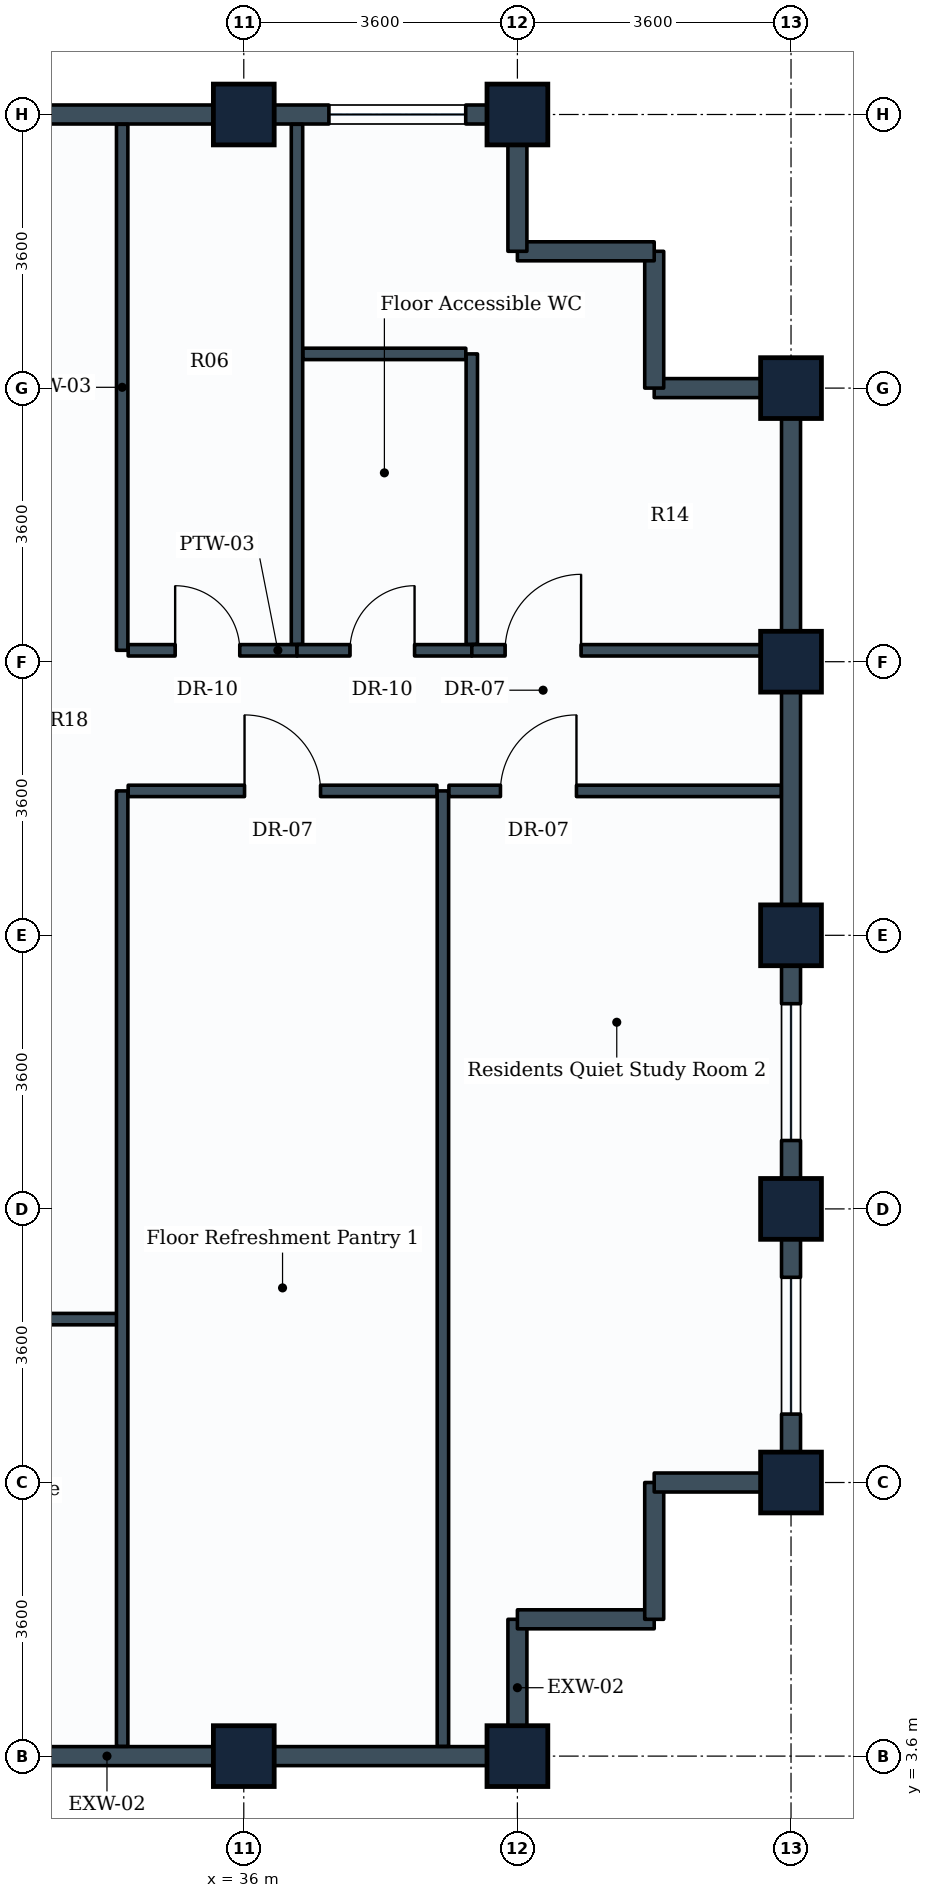
"""IFC4 building model, lengths in metres.
Left out: names, types, materials, properties, quantities, classifications, styles, units other than length and angle.
Written with IfcOpenShell. Run it as: python <this file> out.ifc"""

import sys

from ifc_helpers import new_model, si_unit, direction, frame, frame_2d, origin, origin_2d, place, context, subcontext, project, spatial, rectangle, extrude, element, fill, save


model = new_model("IFC4")
c1 = context("Model", 3, precision=1e-05, world=origin(), true_north=direction((0.0, 1.0)))
c2 = subcontext(c1, "Body", "Model", "MODEL_VIEW")
j1 = project(units=[si_unit("LENGTHUNIT", "METRE"), si_unit("PLANEANGLEUNIT", "RADIAN")], contexts=[c1])
p1 = place(None, origin())
s1 = spatial("IfcSite", under=j1, at=p1, CompositionType="ELEMENT")
p2 = place(p1, origin())
s2 = spatial("IfcBuilding", under=s1, at=p2, CompositionType="ELEMENT")
p3 = place(p2, frame((0.0, 0.0, 266.6)))
s3 = spatial("IfcBuildingStorey", under=s2, at=p3, CompositionType="ELEMENT", Elevation=266.6)
for number, where, z_axis, x_axis in (
    (1, (36.0, 3.6, 0.0), (0.0, 0.0, 1.0), (1.0, 0.0, 0.0)),
    (2, (36.0, 25.2, 0.0), (0.0, 0.0, 1.0), (1.0, 0.0, 0.0)),
    (3, (39.6, 3.6, 0.0), (0.0, 0.0, 1.0), (1.0, 0.0, 0.0)),
    (4, (39.6, 25.2, 0.0), (0.0, 0.0, 1.0), (1.0, 0.0, 0.0)),
    (5, (43.2, 7.2, 0.0), (0.0, 0.0, 1.0), (1.0, 0.0, 0.0)),
    (6, (43.2, 10.8, 0.0), (0.0, 0.0, 1.0), (0.0, 1.0, 0.0)),
    (7, (43.2, 14.4, 0.0), (0.0, 0.0, 1.0), (0.0, 1.0, 0.0)),
    (8, (43.2, 18.0, 0.0), (0.0, 0.0, 1.0), (0.0, 1.0, 0.0)),
    (9, (43.2, 21.6, 0.0), (0.0, 0.0, 1.0), (0.0, 1.0, 0.0)),
):
    element("IfcColumn", number, at=place(p3, frame(where, z_axis=z_axis, x_axis=x_axis)), inside=s3, PredefinedType="COLUMN", context=c2, shape_type="SweptSolid", body=[
        extrude(rectangle(XDim=0.8, YDim=0.8, at=origin_2d()), origin(), (0.0, 0.0, 1.0), 3.6),
    ])
for number, where, z_axis, x_axis in (
    (10, (36.0, 3.6, 0.0), (0.0, 0.0, 1.0), (-1.0, 0.0, 0.0)),
    (11, (39.6, 3.6, 0.0), (0.0, 0.0, 1.0), (-1.0, 0.0, 0.0)),
):
    element("IfcWall", number, at=place(p3, frame(where, z_axis=z_axis, x_axis=x_axis)), inside=s3, PredefinedType="STANDARD", context=c2, shape_type="SweptSolid", body=[
        extrude(rectangle(XDim=3.6, YDim=0.25, at=frame_2d((1.8, 0.0))), origin(), (0.0, 0.0, 1.0), 2.83),
    ])
p4 = place(p3, frame((39.6, 5.4, 0.0), z_axis=(0.0, 0.0, 1.0), x_axis=(0.0, -1.0, 0.0)))
e12 = element("IfcWall", 12, at=p4, inside=s3, PredefinedType="STANDARD", context=c2, shape_type="SweptSolid", body=[
    extrude(rectangle(XDim=1.8, YDim=0.25, at=frame_2d((0.9, 0.0))), origin(), (0.0, 0.0, 1.0), 2.83),
])
p5 = place(p3, frame((41.4, 5.4, 0.0), z_axis=(0.0, 0.0, 1.0), x_axis=(-1.0, 0.0, 0.0)))
e13 = element("IfcWall", 13, at=p5, inside=s3, PredefinedType="STANDARD", context=c2, shape_type="SweptSolid", body=[
    extrude(rectangle(XDim=1.8, YDim=0.25, at=frame_2d((0.9, 0.0))), origin(), (0.0, 0.0, 1.0), 3.335),
])
p6 = place(p3, frame((41.4, 7.2, 0.0), z_axis=(0.0, 0.0, 1.0), x_axis=(0.0, -1.0, 0.0)))
e14 = element("IfcWall", 14, at=p6, inside=s3, PredefinedType="STANDARD", context=c2, shape_type="SweptSolid", body=[
    extrude(rectangle(XDim=1.8, YDim=0.25, at=frame_2d((0.9, 0.0))), origin(), (0.0, 0.0, 1.0), 3.335),
])
p7 = place(p3, frame((43.2, 7.2, 0.0), z_axis=(0.0, 0.0, 1.0), x_axis=(-1.0, 0.0, 0.0)))
e15 = element("IfcWall", 15, at=p7, inside=s3, PredefinedType="STANDARD", context=c2, shape_type="SweptSolid", body=[
    extrude(rectangle(XDim=1.8, YDim=0.25, at=frame_2d((0.9, 0.0))), origin(), (0.0, 0.0, 1.0), 2.83),
])
p8 = place(p3, frame((43.2, 10.8, 0.0), z_axis=(0.0, 0.0, 1.0), x_axis=(0.0, -1.0, 0.0)))
e16 = element("IfcWall", 16, at=p8, inside=s3, PredefinedType="STANDARD", context=c2, shape_type="SweptSolid", body=[
    extrude(rectangle(XDim=3.6, YDim=0.25, at=frame_2d((1.8, 0.0))), origin(), (0.0, 0.0, 1.0), 2.83),
])
p9 = place(p8, frame((0.9, 0.0, 0.85)))
e17 = element("IfcOpeningElement", 17, at=p9, cuts=e16, PredefinedType="OPENING", context=c2, shape_type="SweptSolid", body=[
    extrude(rectangle(XDim=1.8, YDim=1.35, at=frame_2d((0.9, 0.675))), frame((0.0, 0.135, 0.0), z_axis=(0.0, -1.0, 0.0), x_axis=(1.0, 0.0, 0.0)), (0.0, 0.0, 1.0), 0.27),
])
p10 = place(p3, frame((43.2, 14.4, 0.0), z_axis=(0.0, 0.0, 1.0), x_axis=(0.0, -1.0, 0.0)))
e18 = element("IfcWall", 18, at=p10, inside=s3, PredefinedType="STANDARD", context=c2, shape_type="SweptSolid", body=[
    extrude(rectangle(XDim=3.6, YDim=0.25, at=frame_2d((1.8, 0.0))), origin(), (0.0, 0.0, 1.0), 2.83),
])
p11 = place(p10, frame((0.9, 0.0, 0.85)))
e19 = element("IfcOpeningElement", 19, at=p11, cuts=e18, PredefinedType="OPENING", context=c2, shape_type="SweptSolid", body=[
    extrude(rectangle(XDim=1.8, YDim=1.35, at=frame_2d((0.9, 0.675))), frame((0.0, 0.135, 0.0), z_axis=(0.0, -1.0, 0.0), x_axis=(1.0, 0.0, 0.0)), (0.0, 0.0, 1.0), 0.27),
])
for number, where, z_axis, x_axis in (
    (20, (43.2, 18.0, 0.0), (0.0, 0.0, 1.0), (0.0, -1.0, 0.0)),
    (21, (43.2, 21.6, 0.0), (0.0, 0.0, 1.0), (0.0, -1.0, 0.0)),
):
    element("IfcWall", number, at=place(p3, frame(where, z_axis=z_axis, x_axis=x_axis)), inside=s3, PredefinedType="STANDARD", context=c2, shape_type="SweptSolid", body=[
        extrude(rectangle(XDim=3.6, YDim=0.25, at=frame_2d((1.8, 0.0))), origin(), (0.0, 0.0, 1.0), 2.83),
    ])
p12 = place(p3, frame((41.4, 21.6, 0.0), z_axis=(0.0, 0.0, 1.0), x_axis=(1.0, 0.0, 0.0)))
e22 = element("IfcWall", 22, at=p12, inside=s3, PredefinedType="STANDARD", context=c2, shape_type="SweptSolid", body=[
    extrude(rectangle(XDim=1.8, YDim=0.25, at=frame_2d((0.9, 0.0))), origin(), (0.0, 0.0, 1.0), 2.83),
])
for number, where, z_axis, x_axis in (
    (23, (41.4, 23.4, 0.0), (0.0, 0.0, 1.0), (0.0, -1.0, 0.0)),
    (24, (39.6, 23.4, 0.0), (0.0, 0.0, 1.0), (1.0, 0.0, 0.0)),
):
    element("IfcWall", number, at=place(p3, frame(where, z_axis=z_axis, x_axis=x_axis)), inside=s3, PredefinedType="STANDARD", context=c2, shape_type="SweptSolid", body=[
        extrude(rectangle(XDim=1.8, YDim=0.25, at=frame_2d((0.9, 0.0))), origin(), (0.0, 0.0, 1.0), 3.335),
    ])
p13 = place(p3, frame((39.6, 25.2, 0.0), z_axis=(0.0, 0.0, 1.0), x_axis=(0.0, -1.0, 0.0)))
e25 = element("IfcWall", 25, at=p13, inside=s3, PredefinedType="STANDARD", context=c2, shape_type="SweptSolid", body=[
    extrude(rectangle(XDim=1.8, YDim=0.25, at=frame_2d((0.9, 0.0))), origin(), (0.0, 0.0, 1.0), 2.83),
])
p14 = place(p3, frame((36.0, 25.2, 0.0), z_axis=(0.0, 0.0, 1.0), x_axis=(1.0, 0.0, 0.0)))
e26 = element("IfcWall", 26, at=p14, inside=s3, PredefinedType="STANDARD", context=c2, shape_type="SweptSolid", body=[
    extrude(rectangle(XDim=3.6, YDim=0.25, at=frame_2d((1.8, 0.0))), origin(), (0.0, 0.0, 1.0), 2.83),
])
p15 = place(p14, frame((1.12, 0.0, 0.85)))
e27 = element("IfcOpeningElement", 27, at=p15, cuts=e26, PredefinedType="OPENING", context=c2, shape_type="SweptSolid", body=[
    extrude(rectangle(XDim=1.8, YDim=1.35, at=frame_2d((0.9, 0.675))), frame((0.0, 0.135, 0.0), z_axis=(0.0, -1.0, 0.0), x_axis=(1.0, 0.0, 0.0)), (0.0, 0.0, 1.0), 0.27),
])
p16 = place(p3, frame((32.4, 25.2, 0.0), z_axis=(0.0, 0.0, 1.0), x_axis=(1.0, 0.0, 0.0)))
e28 = element("IfcWall", 28, at=p16, inside=s3, PredefinedType="STANDARD", context=c2, shape_type="SweptSolid", body=[
    extrude(rectangle(XDim=3.6, YDim=0.25, at=frame_2d((1.8, 0.0))), origin(), (0.0, 0.0, 1.0), 2.83),
])
p17 = place(p3, frame((34.4, 18.15, 0.0), z_axis=(0.0, 0.0, 1.0), x_axis=(0.0, 1.0, 0.0)))
e29 = element("IfcWall", 29, at=p17, inside=s3, PredefinedType="PARTITIONING", context=c2, shape_type="SweptSolid", body=[
    extrude(rectangle(XDim=6.921, YDim=0.15, at=frame_2d((3.46, 0.0))), origin(), (0.0, 0.0, 1.0), 2.83),
])
p18 = place(p3, frame((34.479, 18.15, 0.0), z_axis=(0.0, 0.0, 1.0), x_axis=(1.0, 0.0, 0.0)))
e30 = element("IfcWall", 30, at=p18, inside=s3, PredefinedType="PARTITIONING", context=c2, shape_type="SweptSolid", body=[
    extrude(rectangle(XDim=2.221, YDim=0.15, at=frame_2d((1.11, 0.0))), origin(), (0.0, 0.0, 1.0), 3.02),
])
p19 = place(p18, frame((0.618, 0.0, 0.0)))
e31 = element("IfcOpeningElement", 31, at=p19, cuts=e30, PredefinedType="OPENING", context=c2, shape_type="SweptSolid", body=[
    extrude(rectangle(XDim=0.85, YDim=2.1, at=frame_2d((0.425, 1.05))), frame((0.0, 0.085, 0.0), z_axis=(0.0, -1.0, 0.0), x_axis=(1.0, 0.0, 0.0)), (0.0, 0.0, 1.0), 0.17),
])
p20 = place(p3, frame((36.7, 18.229, 0.0), z_axis=(0.0, 0.0, 1.0), x_axis=(0.0, 1.0, 0.0)))
e32 = element("IfcWall", 32, at=p20, inside=s3, PredefinedType="PARTITIONING", context=c2, shape_type="SweptSolid", body=[
    extrude(rectangle(XDim=6.842, YDim=0.15, at=frame_2d((3.421, 0.0))), origin(), (0.0, 0.0, 1.0), 2.83),
])
p21 = place(p3, frame((36.7, 18.15, 0.0), z_axis=(0.0, 0.0, 1.0), x_axis=(1.0, 0.0, 0.0)))
e33 = element("IfcWall", 33, at=p21, inside=s3, PredefinedType="PARTITIONING", context=c2, shape_type="SweptSolid", body=[
    extrude(rectangle(XDim=2.3, YDim=0.15, at=frame_2d((1.15, 0.0))), origin(), (0.0, 0.0, 1.0), 3.335),
])
p22 = place(p21, frame((0.697, 0.0, 0.0)))
e34 = element("IfcOpeningElement", 34, at=p22, cuts=e33, PredefinedType="OPENING", context=c2, shape_type="SweptSolid", body=[
    extrude(rectangle(XDim=0.85, YDim=2.1, at=frame_2d((0.425, 1.05))), frame((0.0, 0.085, 0.0), z_axis=(0.0, -1.0, 0.0), x_axis=(1.0, 0.0, 0.0)), (0.0, 0.0, 1.0), 0.17),
])
p23 = place(p3, frame((39.0, 18.229, 0.0), z_axis=(0.0, 0.0, 1.0), x_axis=(0.0, 1.0, 0.0)))
e35 = element("IfcWall", 35, at=p23, inside=s3, PredefinedType="PARTITIONING", context=c2, shape_type="SweptSolid", body=[
    extrude(rectangle(XDim=3.821, YDim=0.15, at=frame_2d((1.911, 0.0))), origin(), (0.0, 0.0, 1.0), 3.335),
])
p24 = place(p3, frame((36.779, 22.05, 0.0), z_axis=(0.0, 0.0, 1.0), x_axis=(1.0, 0.0, 0.0)))
e36 = element("IfcWall", 36, at=p24, inside=s3, PredefinedType="PARTITIONING", context=c2, shape_type="SweptSolid", body=[
    extrude(rectangle(XDim=2.142, YDim=0.15, at=frame_2d((1.071, 0.0))), origin(), (0.0, 0.0, 1.0), 3.335),
])
p25 = place(p3, frame((28.879, 9.35, 0.0), z_axis=(0.0, 0.0, 1.0), x_axis=(1.0, 0.0, 0.0)))
e37 = element("IfcWall", 37, at=p25, inside=s3, PredefinedType="PARTITIONING", context=c2, shape_type="SweptSolid", body=[
    extrude(rectangle(XDim=5.521, YDim=0.15, at=frame_2d((2.76, 0.0))), origin(), (0.0, 0.0, 1.0), 3.335),
])
p26 = place(p25, frame((0.36, 0.0, 0.0)))
e38 = element("IfcOpeningElement", 38, at=p26, cuts=e37, PredefinedType="OPENING", context=c2, shape_type="SweptSolid", body=[
    extrude(rectangle(XDim=1.0, YDim=2.1, at=frame_2d((0.5, 1.05))), frame((0.0, 0.085, 0.0), z_axis=(0.0, -1.0, 0.0), x_axis=(1.0, 0.0, 0.0)), (0.0, 0.0, 1.0), 0.17),
])
for number, where, z_axis, x_axis in (
    (39, (34.4, 3.729, 0.0), (0.0, 0.0, 1.0), (0.0, 1.0, 0.0)),
    (40, (38.62, 3.729, 0.0), (0.0, 0.0, 1.0), (0.0, 1.0, 0.0)),
):
    element("IfcWall", number, at=place(p3, frame(where, z_axis=z_axis, x_axis=x_axis)), inside=s3, PredefinedType="PARTITIONING", context=c2, shape_type="SweptSolid", body=[
        extrude(rectangle(XDim=12.571, YDim=0.15, at=frame_2d((6.286, 0.0))), origin(), (0.0, 0.0, 1.0), 2.83),
    ])
p27 = place(p3, frame((34.479, 16.3, 0.0), z_axis=(0.0, 0.0, 1.0), x_axis=(1.0, 0.0, 0.0)))
e41 = element("IfcWall", 41, at=p27, inside=s3, PredefinedType="PARTITIONING", context=c2, shape_type="SweptSolid", body=[
    extrude(rectangle(XDim=4.062, YDim=0.15, at=frame_2d((2.031, 0.0))), origin(), (0.0, 0.0, 1.0), 3.02),
])
p28 = place(p27, frame((1.531, 0.0, 0.0)))
e42 = element("IfcOpeningElement", 42, at=p28, cuts=e41, PredefinedType="OPENING", context=c2, shape_type="SweptSolid", body=[
    extrude(rectangle(XDim=1.0, YDim=2.1, at=frame_2d((0.5, 1.05))), frame((0.0, 0.085, 0.0), z_axis=(0.0, -1.0, 0.0), x_axis=(1.0, 0.0, 0.0)), (0.0, 0.0, 1.0), 0.17),
])
p29 = place(p3, frame((38.699, 16.3, 0.0), z_axis=(0.0, 0.0, 1.0), x_axis=(1.0, 0.0, 0.0)))
e43 = element("IfcWall", 43, at=p29, inside=s3, PredefinedType="PARTITIONING", context=c2, shape_type="SweptSolid", body=[
    extrude(rectangle(XDim=4.372, YDim=0.15, at=frame_2d((2.186, 0.0))), origin(), (0.0, 0.0, 1.0), 2.83),
])
p30 = place(p29, frame((0.678, 0.0, 0.0)))
e44 = element("IfcOpeningElement", 44, at=p30, cuts=e43, PredefinedType="OPENING", context=c2, shape_type="SweptSolid", body=[
    extrude(rectangle(XDim=1.0, YDim=2.1, at=frame_2d((0.5, 1.05))), frame((0.0, 0.085, 0.0), z_axis=(0.0, -1.0, 0.0), x_axis=(1.0, 0.0, 0.0)), (0.0, 0.0, 1.0), 0.17),
])
p31 = place(p3, frame((39.0, 18.15, 0.0), z_axis=(0.0, 0.0, 1.0), x_axis=(1.0, 0.0, 0.0)))
e45 = element("IfcWall", 45, at=p31, inside=s3, PredefinedType="PARTITIONING", context=c2, shape_type="SweptSolid", body=[
    extrude(rectangle(XDim=4.071, YDim=0.15, at=frame_2d((2.036, 0.0))), origin(), (0.0, 0.0, 1.0), 2.83),
])
p32 = place(p31, frame((0.438, 0.0, 0.0)))
e46 = element("IfcOpeningElement", 46, at=p32, cuts=e45, PredefinedType="OPENING", context=c2, shape_type="SweptSolid", body=[
    extrude(rectangle(XDim=1.0, YDim=2.1, at=frame_2d((0.5, 1.05))), frame((0.0, 0.085, 0.0), z_axis=(0.0, -1.0, 0.0), x_axis=(1.0, 0.0, 0.0)), (0.0, 0.0, 1.0), 0.17),
])
p33 = place(p9, origin())
e47 = element("IfcWindow", 47, at=p33, inside=s3, PartitioningType="SINGLE_PANEL", PredefinedType="WINDOW", context=c2, shape_type="SweptSolid", body=[
    extrude(rectangle(XDim=1.8, YDim=1.35, at=frame_2d((0.9, 0.675))), frame((0.0, 0.03, 0.0), z_axis=(0.0, -1.0, 0.0), x_axis=(1.0, 0.0, 0.0)), (0.0, 0.0, 1.0), 0.06),
])
fill(e17, e47)
p34 = place(p11, origin())
e48 = element("IfcWindow", 48, at=p34, inside=s3, PartitioningType="SINGLE_PANEL", PredefinedType="WINDOW", context=c2, shape_type="SweptSolid", body=[
    extrude(rectangle(XDim=1.8, YDim=1.35, at=frame_2d((0.9, 0.675))), frame((0.0, 0.03, 0.0), z_axis=(0.0, -1.0, 0.0), x_axis=(1.0, 0.0, 0.0)), (0.0, 0.0, 1.0), 0.06),
])
fill(e19, e48)
p35 = place(p15, origin())
e49 = element("IfcWindow", 49, at=p35, inside=s3, PartitioningType="SINGLE_PANEL", PredefinedType="WINDOW", context=c2, shape_type="SweptSolid", body=[
    extrude(rectangle(XDim=1.8, YDim=1.35, at=frame_2d((0.9, 0.675))), frame((0.0, 0.03, 0.0), z_axis=(0.0, -1.0, 0.0), x_axis=(1.0, 0.0, 0.0)), (0.0, 0.0, 1.0), 0.06),
])
fill(e27, e49)
p36 = place(p19, origin())
e50 = element("IfcDoor", 50, at=p36, inside=s3, OperationType="SINGLE_SWING_LEFT", PredefinedType="DOOR", context=c2, shape_type="SweptSolid", body=[
    extrude(rectangle(XDim=0.85, YDim=2.1, at=frame_2d((0.425, 1.05))), frame((0.0, 0.025, 0.0), z_axis=(0.0, -1.0, 0.0), x_axis=(1.0, 0.0, 0.0)), (0.0, 0.0, 1.0), 0.05),
])
fill(e31, e50)
p37 = place(p22, origin())
e51 = element("IfcDoor", 51, at=p37, inside=s3, OperationType="SINGLE_SWING_RIGHT", PredefinedType="DOOR", context=c2, shape_type="SweptSolid", body=[
    extrude(rectangle(XDim=0.85, YDim=2.1, at=frame_2d((0.425, 1.05))), frame((0.0, 0.025, 0.0), z_axis=(0.0, -1.0, 0.0), x_axis=(1.0, 0.0, 0.0)), (0.0, 0.0, 1.0), 0.05),
])
fill(e34, e51)
p38 = place(p28, origin())
e52 = element("IfcDoor", 52, at=p38, inside=s3, OperationType="SINGLE_SWING_LEFT", PredefinedType="DOOR", context=c2, shape_type="SweptSolid", body=[
    extrude(rectangle(XDim=1.0, YDim=2.1, at=frame_2d((0.5, 1.05))), frame((0.0, 0.025, 0.0), z_axis=(0.0, -1.0, 0.0), x_axis=(1.0, 0.0, 0.0)), (0.0, 0.0, 1.0), 0.05),
])
fill(e42, e52)
p39 = place(p30, origin())
e53 = element("IfcDoor", 53, at=p39, inside=s3, OperationType="SINGLE_SWING_RIGHT", PredefinedType="DOOR", context=c2, shape_type="SweptSolid", body=[
    extrude(rectangle(XDim=1.0, YDim=2.1, at=frame_2d((0.5, 1.05))), frame((0.0, 0.025, 0.0), z_axis=(0.0, -1.0, 0.0), x_axis=(1.0, 0.0, 0.0)), (0.0, 0.0, 1.0), 0.05),
])
fill(e44, e53)
p40 = place(p32, origin())
e54 = element("IfcDoor", 54, at=p40, inside=s3, OperationType="SINGLE_SWING_RIGHT", PredefinedType="DOOR", context=c2, shape_type="SweptSolid", body=[
    extrude(rectangle(XDim=1.0, YDim=2.1, at=frame_2d((0.5, 1.05))), frame((0.0, 0.025, 0.0), z_axis=(0.0, -1.0, 0.0), x_axis=(1.0, 0.0, 0.0)), (0.0, 0.0, 1.0), 0.05),
])
fill(e46, e54)
save(model, sys.argv[1])
